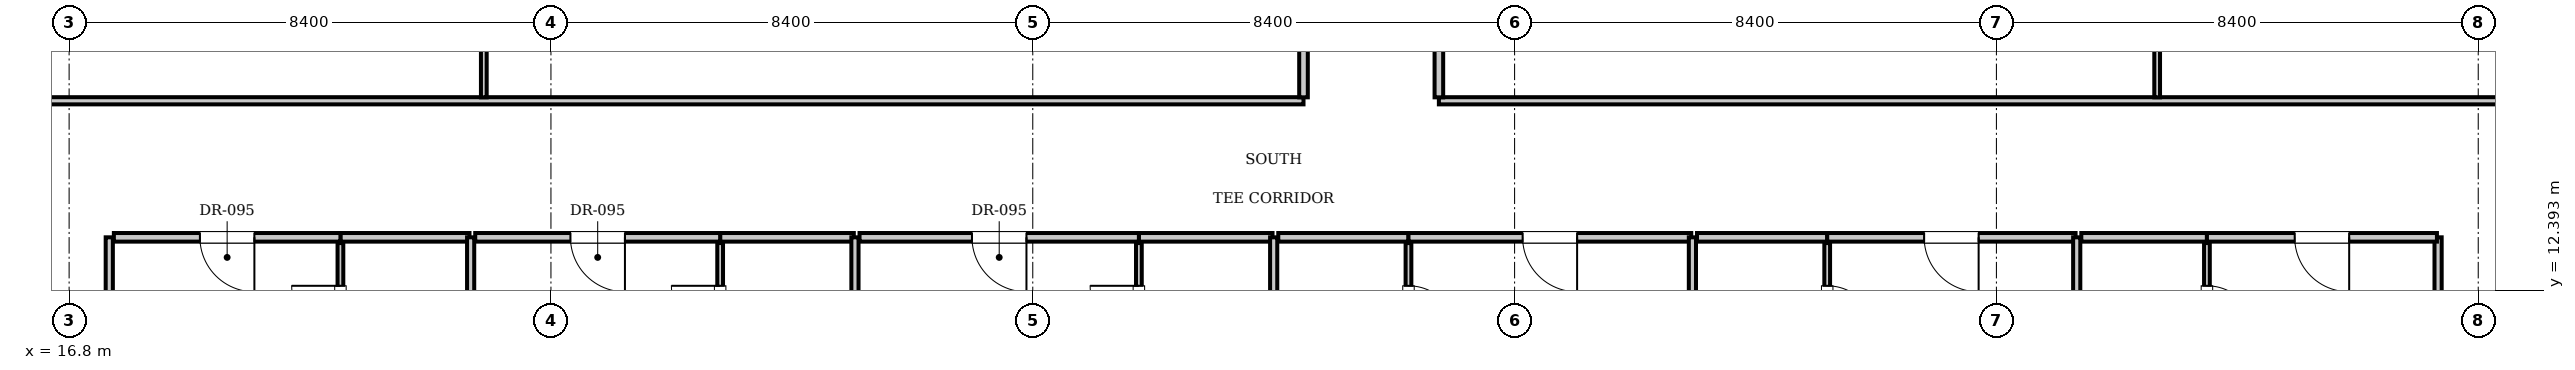
"""IFC4 building model, lengths in metres.
Left out: names, types, materials, properties, quantities, classifications, styles, units other than length and angle.
Written with IfcOpenShell. Run it as: python <this file> out.ifc"""

import sys

from ifc_helpers import new_model, si_unit, direction, frame, frame_2d, origin, place, context, subcontext, project, spatial, rectangle, extrude, element, fill, save


model = new_model("IFC4")
c1 = context("Model", 3, precision=1e-05, world=origin(), true_north=direction((0.0, 1.0)))
c2 = subcontext(c1, "Body", "Model", "MODEL_VIEW")
j1 = project(units=[si_unit("LENGTHUNIT", "METRE"), si_unit("PLANEANGLEUNIT", "RADIAN")], contexts=[c1])
p1 = place(None, origin())
s1 = spatial("IfcSite", under=j1, at=p1, CompositionType="ELEMENT")
p2 = place(p1, origin())
s2 = spatial("IfcBuilding", under=s1, at=p2, CompositionType="ELEMENT")
p3 = place(p2, frame((0.0, 0.0, 200.55)))
s3 = spatial("IfcBuildingStorey", under=s2, at=p3, CompositionType="ELEMENT", Elevation=200.55)
for number, where, z_axis, x_axis in (
    (1, (17.5, 9.0, 0.0), (0.0, 0.0, 1.0), (0.0, 1.0, 0.0)),
    (2, (58.1, 9.0, 0.0), (0.0, 0.0, 1.0), (0.0, 1.0, 0.0)),
):
    element("IfcWall", number, at=place(p3, frame(where, z_axis=z_axis, x_axis=x_axis)), inside=s3, PredefinedType="PARTITIONING", context=c2, shape_type="SweptSolid", body=[
        extrude(rectangle(XDim=4.32, YDim=0.125, at=frame_2d((2.16, 0.0))), origin(), (0.0, 0.0, 1.0), 3.61),
    ])
p4 = place(p3, frame((21.53, 13.32, 0.0), z_axis=(0.0, 0.0, 1.0), x_axis=(1.0, 0.0, 0.0)))
e3 = element("IfcWall", 3, at=p4, inside=s3, PredefinedType="PARTITIONING", context=c2, shape_type="SweptSolid", body=[
    extrude(rectangle(XDim=2.25, YDim=0.15, at=frame_2d((1.125, 0.0))), origin(), (0.0, 0.0, 1.0), 3.61),
])
p5 = place(p3, frame((21.53, 10.88, 0.0), z_axis=(0.0, 0.0, 1.0), x_axis=(0.0, 1.0, 0.0)))
e4 = element("IfcWall", 4, at=p5, inside=s3, PredefinedType="PARTITIONING", context=c2, shape_type="SweptSolid", body=[
    extrude(rectangle(XDim=2.34, YDim=0.1, at=frame_2d((1.17, 0.0))), origin(), (0.0, 0.0, 1.0), 3.61),
])
p6 = place(p5, frame((0.745, 0.0, 0.0)))
e5 = element("IfcOpeningElement", 5, at=p6, cuts=e4, PredefinedType="OPENING", context=c2, shape_type="SweptSolid", body=[
    extrude(rectangle(XDim=0.85, YDim=2.1, at=frame_2d((0.425, 1.05))), frame((0.0, 0.06, 0.0), z_axis=(0.0, -1.0, 0.0), x_axis=(1.0, 0.0, 0.0)), (0.0, 0.0, 1.0), 0.12),
])
p7 = place(p3, frame((17.58, 13.32, 0.0), z_axis=(0.0, 0.0, 1.0), x_axis=(1.0, 0.0, 0.0)))
e6 = element("IfcWall", 6, at=p7, inside=s3, PredefinedType="PARTITIONING", context=c2, shape_type="SweptSolid", body=[
    extrude(rectangle(XDim=3.95, YDim=0.15, at=frame_2d((1.975, 0.0))), origin(), (0.0, 0.0, 1.0), 3.61),
])
p8 = place(p7, frame((1.5, 0.0, 0.0)))
e7 = element("IfcOpeningElement", 7, at=p8, cuts=e6, PredefinedType="OPENING", context=c2, shape_type="SweptSolid", body=[
    extrude(rectangle(XDim=0.95, YDim=2.15, at=frame_2d((0.475, 1.075))), frame((0.0, 0.085, 0.0), z_axis=(0.0, -1.0, 0.0), x_axis=(1.0, 0.0, 0.0)), (0.0, 0.0, 1.0), 0.17),
])
p9 = place(p3, frame((23.8, 4.7, 0.0), z_axis=(0.0, 0.0, 1.0), x_axis=(0.0, 1.0, 0.0)))
e8 = element("IfcWall", 8, at=p9, inside=s3, PredefinedType="PARTITIONING", context=c2, shape_type="SweptSolid", body=[
    extrude(rectangle(XDim=8.62, YDim=0.125, at=frame_2d((4.31, 0.0))), origin(), (0.0, 0.0, 1.0), 3.61),
])
p10 = place(p3, frame((28.15, 13.32, 0.0), z_axis=(0.0, 0.0, 1.0), x_axis=(1.0, 0.0, 0.0)))
e9 = element("IfcWall", 9, at=p10, inside=s3, PredefinedType="PARTITIONING", context=c2, shape_type="SweptSolid", body=[
    extrude(rectangle(XDim=2.33, YDim=0.15, at=frame_2d((1.165, 0.0))), origin(), (0.0, 0.0, 1.0), 3.61),
])
p11 = place(p3, frame((28.15, 10.88, 0.0), z_axis=(0.0, 0.0, 1.0), x_axis=(0.0, 1.0, 0.0)))
e10 = element("IfcWall", 10, at=p11, inside=s3, PredefinedType="PARTITIONING", context=c2, shape_type="SweptSolid", body=[
    extrude(rectangle(XDim=2.34, YDim=0.1, at=frame_2d((1.17, 0.0))), origin(), (0.0, 0.0, 1.0), 3.61),
])
p12 = place(p11, frame((0.745, 0.0, 0.0)))
e11 = element("IfcOpeningElement", 11, at=p12, cuts=e10, PredefinedType="OPENING", context=c2, shape_type="SweptSolid", body=[
    extrude(rectangle(XDim=0.85, YDim=2.1, at=frame_2d((0.425, 1.05))), frame((0.0, 0.06, 0.0), z_axis=(0.0, -1.0, 0.0), x_axis=(1.0, 0.0, 0.0)), (0.0, 0.0, 1.0), 0.12),
])
p13 = place(p3, frame((23.88, 13.32, 0.0), z_axis=(0.0, 0.0, 1.0), x_axis=(1.0, 0.0, 0.0)))
e12 = element("IfcWall", 12, at=p13, inside=s3, PredefinedType="PARTITIONING", context=c2, shape_type="SweptSolid", body=[
    extrude(rectangle(XDim=4.27, YDim=0.15, at=frame_2d((2.135, 0.0))), origin(), (0.0, 0.0, 1.0), 3.61),
])
p14 = place(p13, frame((1.66, 0.0, 0.0)))
e13 = element("IfcOpeningElement", 13, at=p14, cuts=e12, PredefinedType="OPENING", context=c2, shape_type="SweptSolid", body=[
    extrude(rectangle(XDim=0.95, YDim=2.15, at=frame_2d((0.475, 1.075))), frame((0.0, 0.085, 0.0), z_axis=(0.0, -1.0, 0.0), x_axis=(1.0, 0.0, 0.0)), (0.0, 0.0, 1.0), 0.17),
])
p15 = place(p3, frame((30.5, 4.7, 0.0), z_axis=(0.0, 0.0, 1.0), x_axis=(0.0, 1.0, 0.0)))
e14 = element("IfcWall", 14, at=p15, inside=s3, PredefinedType="PARTITIONING", context=c2, shape_type="SweptSolid", body=[
    extrude(rectangle(XDim=8.62, YDim=0.125, at=frame_2d((4.31, 0.0))), origin(), (0.0, 0.0, 1.0), 3.61),
])
p16 = place(p3, frame((35.45, 13.32, 0.0), z_axis=(0.0, 0.0, 1.0), x_axis=(1.0, 0.0, 0.0)))
e15 = element("IfcWall", 15, at=p16, inside=s3, PredefinedType="PARTITIONING", context=c2, shape_type="SweptSolid", body=[
    extrude(rectangle(XDim=2.33, YDim=0.15, at=frame_2d((1.165, 0.0))), origin(), (0.0, 0.0, 1.0), 3.61),
])
p17 = place(p3, frame((35.45, 10.88, 0.0), z_axis=(0.0, 0.0, 1.0), x_axis=(0.0, 1.0, 0.0)))
e16 = element("IfcWall", 16, at=p17, inside=s3, PredefinedType="PARTITIONING", context=c2, shape_type="SweptSolid", body=[
    extrude(rectangle(XDim=2.34, YDim=0.1, at=frame_2d((1.17, 0.0))), origin(), (0.0, 0.0, 1.0), 3.61),
])
p18 = place(p17, frame((0.745, 0.0, 0.0)))
e17 = element("IfcOpeningElement", 17, at=p18, cuts=e16, PredefinedType="OPENING", context=c2, shape_type="SweptSolid", body=[
    extrude(rectangle(XDim=0.85, YDim=2.1, at=frame_2d((0.425, 1.05))), frame((0.0, 0.06, 0.0), z_axis=(0.0, -1.0, 0.0), x_axis=(1.0, 0.0, 0.0)), (0.0, 0.0, 1.0), 0.12),
])
p19 = place(p3, frame((30.58, 13.32, 0.0), z_axis=(0.0, 0.0, 1.0), x_axis=(1.0, 0.0, 0.0)))
e18 = element("IfcWall", 18, at=p19, inside=s3, PredefinedType="PARTITIONING", context=c2, shape_type="SweptSolid", body=[
    extrude(rectangle(XDim=4.87, YDim=0.15, at=frame_2d((2.435, 0.0))), origin(), (0.0, 0.0, 1.0), 3.61),
])
p20 = place(p19, frame((1.96, 0.0, 0.0)))
e19 = element("IfcOpeningElement", 19, at=p20, cuts=e18, PredefinedType="OPENING", context=c2, shape_type="SweptSolid", body=[
    extrude(rectangle(XDim=0.95, YDim=2.15, at=frame_2d((0.475, 1.075))), frame((0.0, 0.085, 0.0), z_axis=(0.0, -1.0, 0.0), x_axis=(1.0, 0.0, 0.0)), (0.0, 0.0, 1.0), 0.17),
])
p21 = place(p3, frame((37.8, 4.7, 0.0), z_axis=(0.0, 0.0, 1.0), x_axis=(0.0, 1.0, 0.0)))
e20 = element("IfcWall", 20, at=p21, inside=s3, PredefinedType="PARTITIONING", context=c2, shape_type="SweptSolid", body=[
    extrude(rectangle(XDim=8.62, YDim=0.125, at=frame_2d((4.31, 0.0))), origin(), (0.0, 0.0, 1.0), 3.352),
])
p22 = place(p3, frame((37.88, 13.32, 0.0), z_axis=(0.0, 0.0, 1.0), x_axis=(1.0, 0.0, 0.0)))
e21 = element("IfcWall", 21, at=p22, inside=s3, PredefinedType="PARTITIONING", context=c2, shape_type="SweptSolid", body=[
    extrude(rectangle(XDim=2.27, YDim=0.15, at=frame_2d((1.135, 0.0))), origin(), (0.0, 0.0, 1.0), 3.61),
])
p23 = place(p3, frame((40.15, 10.88, 0.0), z_axis=(0.0, 0.0, 1.0), x_axis=(0.0, 1.0, 0.0)))
e22 = element("IfcWall", 22, at=p23, inside=s3, PredefinedType="PARTITIONING", context=c2, shape_type="SweptSolid", body=[
    extrude(rectangle(XDim=2.34, YDim=0.1, at=frame_2d((1.17, 0.0))), origin(), (0.0, 0.0, 1.0), 3.61),
])
p24 = place(p23, frame((0.745, 0.0, 0.0)))
e23 = element("IfcOpeningElement", 23, at=p24, cuts=e22, PredefinedType="OPENING", context=c2, shape_type="SweptSolid", body=[
    extrude(rectangle(XDim=0.85, YDim=2.1, at=frame_2d((0.425, 1.05))), frame((0.0, 0.06, 0.0), z_axis=(0.0, -1.0, 0.0), x_axis=(1.0, 0.0, 0.0)), (0.0, 0.0, 1.0), 0.12),
])
p25 = place(p3, frame((40.15, 13.32, 0.0), z_axis=(0.0, 0.0, 1.0), x_axis=(1.0, 0.0, 0.0)))
e24 = element("IfcWall", 24, at=p25, inside=s3, PredefinedType="PARTITIONING", context=c2, shape_type="SweptSolid", body=[
    extrude(rectangle(XDim=4.93, YDim=0.15, at=frame_2d((2.465, 0.0))), origin(), (0.0, 0.0, 1.0), 3.61),
])
p26 = place(p25, frame((1.99, 0.0, 0.0)))
e25 = element("IfcOpeningElement", 25, at=p26, cuts=e24, PredefinedType="OPENING", context=c2, shape_type="SweptSolid", body=[
    extrude(rectangle(XDim=0.95, YDim=2.15, at=frame_2d((0.475, 1.075))), frame((0.0, 0.085, 0.0), z_axis=(0.0, -1.0, 0.0), x_axis=(1.0, 0.0, 0.0)), (0.0, 0.0, 1.0), 0.17),
])
p27 = place(p3, frame((45.1, 4.7, 0.0), z_axis=(0.0, 0.0, 1.0), x_axis=(0.0, 1.0, 0.0)))
e26 = element("IfcWall", 26, at=p27, inside=s3, PredefinedType="PARTITIONING", context=c2, shape_type="SweptSolid", body=[
    extrude(rectangle(XDim=8.62, YDim=0.125, at=frame_2d((4.31, 0.0))), origin(), (0.0, 0.0, 1.0), 3.61),
])
p28 = place(p3, frame((45.18, 13.32, 0.0), z_axis=(0.0, 0.0, 1.0), x_axis=(1.0, 0.0, 0.0)))
e27 = element("IfcWall", 27, at=p28, inside=s3, PredefinedType="PARTITIONING", context=c2, shape_type="SweptSolid", body=[
    extrude(rectangle(XDim=2.27, YDim=0.15, at=frame_2d((1.135, 0.0))), origin(), (0.0, 0.0, 1.0), 3.61),
])
p29 = place(p3, frame((47.45, 10.88, 0.0), z_axis=(0.0, 0.0, 1.0), x_axis=(0.0, 1.0, 0.0)))
e28 = element("IfcWall", 28, at=p29, inside=s3, PredefinedType="PARTITIONING", context=c2, shape_type="SweptSolid", body=[
    extrude(rectangle(XDim=2.34, YDim=0.1, at=frame_2d((1.17, 0.0))), origin(), (0.0, 0.0, 1.0), 3.61),
])
p30 = place(p29, frame((0.745, 0.0, 0.0)))
e29 = element("IfcOpeningElement", 29, at=p30, cuts=e28, PredefinedType="OPENING", context=c2, shape_type="SweptSolid", body=[
    extrude(rectangle(XDim=0.85, YDim=2.1, at=frame_2d((0.425, 1.05))), frame((0.0, 0.06, 0.0), z_axis=(0.0, -1.0, 0.0), x_axis=(1.0, 0.0, 0.0)), (0.0, 0.0, 1.0), 0.12),
])
p31 = place(p3, frame((47.45, 13.32, 0.0), z_axis=(0.0, 0.0, 1.0), x_axis=(1.0, 0.0, 0.0)))
e30 = element("IfcWall", 30, at=p31, inside=s3, PredefinedType="PARTITIONING", context=c2, shape_type="SweptSolid", body=[
    extrude(rectangle(XDim=4.33, YDim=0.15, at=frame_2d((2.165, 0.0))), origin(), (0.0, 0.0, 1.0), 3.61),
])
p32 = place(p31, frame((1.69, 0.0, 0.0)))
e31 = element("IfcOpeningElement", 31, at=p32, cuts=e30, PredefinedType="OPENING", context=c2, shape_type="SweptSolid", body=[
    extrude(rectangle(XDim=0.95, YDim=2.15, at=frame_2d((0.475, 1.075))), frame((0.0, 0.085, 0.0), z_axis=(0.0, -1.0, 0.0), x_axis=(1.0, 0.0, 0.0)), (0.0, 0.0, 1.0), 0.17),
])
p33 = place(p3, frame((51.8, 4.7, 0.0), z_axis=(0.0, 0.0, 1.0), x_axis=(0.0, 1.0, 0.0)))
e32 = element("IfcWall", 32, at=p33, inside=s3, PredefinedType="PARTITIONING", context=c2, shape_type="SweptSolid", body=[
    extrude(rectangle(XDim=8.62, YDim=0.125, at=frame_2d((4.31, 0.0))), origin(), (0.0, 0.0, 1.0), 3.61),
])
p34 = place(p3, frame((51.88, 13.32, 0.0), z_axis=(0.0, 0.0, 1.0), x_axis=(1.0, 0.0, 0.0)))
e33 = element("IfcWall", 33, at=p34, inside=s3, PredefinedType="PARTITIONING", context=c2, shape_type="SweptSolid", body=[
    extrude(rectangle(XDim=2.19, YDim=0.15, at=frame_2d((1.095, 0.0))), origin(), (0.0, 0.0, 1.0), 3.61),
])
p35 = place(p3, frame((54.07, 10.88, 0.0), z_axis=(0.0, 0.0, 1.0), x_axis=(0.0, 1.0, 0.0)))
e34 = element("IfcWall", 34, at=p35, inside=s3, PredefinedType="PARTITIONING", context=c2, shape_type="SweptSolid", body=[
    extrude(rectangle(XDim=2.34, YDim=0.1, at=frame_2d((1.17, 0.0))), origin(), (0.0, 0.0, 1.0), 3.61),
])
p36 = place(p35, frame((0.745, 0.0, 0.0)))
e35 = element("IfcOpeningElement", 35, at=p36, cuts=e34, PredefinedType="OPENING", context=c2, shape_type="SweptSolid", body=[
    extrude(rectangle(XDim=0.85, YDim=2.1, at=frame_2d((0.425, 1.05))), frame((0.0, 0.06, 0.0), z_axis=(0.0, -1.0, 0.0), x_axis=(1.0, 0.0, 0.0)), (0.0, 0.0, 1.0), 0.12),
])
p37 = place(p3, frame((54.07, 13.32, 0.0), z_axis=(0.0, 0.0, 1.0), x_axis=(1.0, 0.0, 0.0)))
e36 = element("IfcWall", 36, at=p37, inside=s3, PredefinedType="PARTITIONING", context=c2, shape_type="SweptSolid", body=[
    extrude(rectangle(XDim=4.01, YDim=0.15, at=frame_2d((2.005, 0.0))), origin(), (0.0, 0.0, 1.0), 3.61),
])
p38 = place(p37, frame((1.53, 0.0, 0.0)))
e37 = element("IfcOpeningElement", 37, at=p38, cuts=e36, PredefinedType="OPENING", context=c2, shape_type="SweptSolid", body=[
    extrude(rectangle(XDim=0.95, YDim=2.15, at=frame_2d((0.475, 1.075))), frame((0.0, 0.085, 0.0), z_axis=(0.0, -1.0, 0.0), x_axis=(1.0, 0.0, 0.0)), (0.0, 0.0, 1.0), 0.17),
])
p39 = place(p3, frame((13.2, 15.7, 0.0), z_axis=(0.0, 0.0, 1.0), x_axis=(1.0, 0.0, 0.0)))
e38 = element("IfcWall", 38, at=p39, inside=s3, PredefinedType="PARTITIONING", context=c2, shape_type="SweptSolid", body=[
    extrude(rectangle(XDim=25.12, YDim=0.125, at=frame_2d((12.56, 0.0))), origin(), (0.0, 0.0, 1.0), 3.61),
])
p40 = place(p3, frame((40.68, 15.7, 0.0), z_axis=(0.0, 0.0, 1.0), x_axis=(1.0, 0.0, 0.0)))
e39 = element("IfcWall", 39, at=p40, inside=s3, PredefinedType="PARTITIONING", context=c2, shape_type="SweptSolid", body=[
    extrude(rectangle(XDim=21.72, YDim=0.125, at=frame_2d((10.86, 0.0))), origin(), (0.0, 0.0, 1.0), 3.61),
])
p41 = place(p3, frame((38.32, 15.76, 0.0), z_axis=(0.0, 0.0, 1.0), x_axis=(0.0, 1.0, 0.0)))
e40 = element("IfcWall", 40, at=p41, inside=s3, PredefinedType="PARTITIONING", context=c2, shape_type="SweptSolid", body=[
    extrude(rectangle(XDim=5.14, YDim=0.15, at=frame_2d((2.57, 0.0))), origin(), (0.0, 0.0, 1.0), 3.61),
])
p42 = place(p41, frame((2.095, 0.0, 0.0)))
e41 = element("IfcOpeningElement", 41, at=p42, cuts=e40, PredefinedType="OPENING", context=c2, shape_type="SweptSolid", body=[
    extrude(rectangle(XDim=0.95, YDim=2.15, at=frame_2d((0.475, 1.075))), frame((0.0, 0.085, 0.0), z_axis=(0.0, -1.0, 0.0), x_axis=(1.0, 0.0, 0.0)), (0.0, 0.0, 1.0), 0.17),
])
p43 = place(p3, frame((24.03, 15.76, 0.0), z_axis=(0.0, 0.0, 1.0), x_axis=(0.0, 1.0, 0.0)))
e42 = element("IfcWall", 42, at=p43, inside=s3, PredefinedType="PARTITIONING", context=c2, shape_type="SweptSolid", body=[
    extrude(rectangle(XDim=7.43, YDim=0.1, at=frame_2d((3.715, 0.0))), origin(), (0.0, 0.0, 1.0), 3.61),
])
p44 = place(p43, frame((3.265, 0.0, 0.0)))
e43 = element("IfcOpeningElement", 43, at=p44, cuts=e42, PredefinedType="OPENING", context=c2, shape_type="SweptSolid", body=[
    extrude(rectangle(XDim=0.9, YDim=2.1, at=frame_2d((0.45, 1.05))), frame((0.0, 0.06, 0.0), z_axis=(0.0, -1.0, 0.0), x_axis=(1.0, 0.0, 0.0)), (0.0, 0.0, 1.0), 0.12),
])
p45 = place(p3, frame((40.68, 15.76, 0.0), z_axis=(0.0, 0.0, 1.0), x_axis=(0.0, 1.0, 0.0)))
e44 = element("IfcWall", 44, at=p45, inside=s3, PredefinedType="PARTITIONING", context=c2, shape_type="SweptSolid", body=[
    extrude(rectangle(XDim=5.14, YDim=0.15, at=frame_2d((2.57, 0.0))), origin(), (0.0, 0.0, 1.0), 3.61),
])
p46 = place(p45, frame((3.055, 0.0, 0.0)))
e45 = element("IfcOpeningElement", 45, at=p46, cuts=e44, PredefinedType="OPENING", context=c2, shape_type="SweptSolid", body=[
    extrude(rectangle(XDim=0.95, YDim=2.15, at=frame_2d((0.475, 1.075))), frame((0.0, 0.085, 0.0), z_axis=(0.0, -1.0, 0.0), x_axis=(1.0, 0.0, 0.0)), (0.0, 0.0, 1.0), 0.17),
])
p47 = place(p3, frame((53.202, 15.76, 0.0), z_axis=(0.0, 0.0, 1.0), x_axis=(0.0, 1.0, 0.0)))
e46 = element("IfcWall", 46, at=p47, inside=s3, PredefinedType="PARTITIONING", context=c2, shape_type="SweptSolid", body=[
    extrude(rectangle(XDim=7.43, YDim=0.1, at=frame_2d((3.715, 0.0))), origin(), (0.0, 0.0, 1.0), 3.61),
])
p48 = place(p47, frame((3.265, 0.0, 0.0)))
e47 = element("IfcOpeningElement", 47, at=p48, cuts=e46, PredefinedType="OPENING", context=c2, shape_type="SweptSolid", body=[
    extrude(rectangle(XDim=0.9, YDim=2.1, at=frame_2d((0.45, 1.05))), frame((0.0, 0.06, 0.0), z_axis=(0.0, -1.0, 0.0), x_axis=(1.0, 0.0, 0.0)), (0.0, 0.0, 1.0), 0.12),
])
p49 = place(p6, origin())
e48 = element("IfcDoor", 48, at=p49, inside=s3, OperationType="SINGLE_SWING_RIGHT", PredefinedType="DOOR", context=c2, shape_type="SweptSolid", body=[
    extrude(rectangle(XDim=0.85, YDim=2.1, at=frame_2d((0.425, 1.05))), frame((0.0, 0.025, 0.0), z_axis=(0.0, -1.0, 0.0), x_axis=(1.0, 0.0, 0.0)), (0.0, 0.0, 1.0), 0.05),
])
fill(e5, e48)
p50 = place(p8, frame((0.95, 0.0, 0.0), z_axis=(0.0, 0.0, 1.0), x_axis=(-1.0, 0.0, 0.0)))
e49 = element("IfcDoor", 49, at=p50, inside=s3, OperationType="SINGLE_SWING_LEFT", PredefinedType="DOOR", context=c2, shape_type="SweptSolid", body=[
    extrude(rectangle(XDim=0.95, YDim=2.15, at=frame_2d((0.475, 1.075))), frame((0.0, 0.025, 0.0), z_axis=(0.0, -1.0, 0.0), x_axis=(1.0, 0.0, 0.0)), (0.0, 0.0, 1.0), 0.05),
])
fill(e7, e49)
p51 = place(p12, origin())
e50 = element("IfcDoor", 50, at=p51, inside=s3, OperationType="SINGLE_SWING_RIGHT", PredefinedType="DOOR", context=c2, shape_type="SweptSolid", body=[
    extrude(rectangle(XDim=0.85, YDim=2.1, at=frame_2d((0.425, 1.05))), frame((0.0, 0.025, 0.0), z_axis=(0.0, -1.0, 0.0), x_axis=(1.0, 0.0, 0.0)), (0.0, 0.0, 1.0), 0.05),
])
fill(e11, e50)
p52 = place(p14, frame((0.95, 0.0, 0.0), z_axis=(0.0, 0.0, 1.0), x_axis=(-1.0, 0.0, 0.0)))
e51 = element("IfcDoor", 51, at=p52, inside=s3, OperationType="SINGLE_SWING_LEFT", PredefinedType="DOOR", context=c2, shape_type="SweptSolid", body=[
    extrude(rectangle(XDim=0.95, YDim=2.15, at=frame_2d((0.475, 1.075))), frame((0.0, 0.025, 0.0), z_axis=(0.0, -1.0, 0.0), x_axis=(1.0, 0.0, 0.0)), (0.0, 0.0, 1.0), 0.05),
])
fill(e13, e51)
p53 = place(p18, origin())
e52 = element("IfcDoor", 52, at=p53, inside=s3, OperationType="SINGLE_SWING_RIGHT", PredefinedType="DOOR", context=c2, shape_type="SweptSolid", body=[
    extrude(rectangle(XDim=0.85, YDim=2.1, at=frame_2d((0.425, 1.05))), frame((0.0, 0.025, 0.0), z_axis=(0.0, -1.0, 0.0), x_axis=(1.0, 0.0, 0.0)), (0.0, 0.0, 1.0), 0.05),
])
fill(e17, e52)
p54 = place(p20, frame((0.95, 0.0, 0.0), z_axis=(0.0, 0.0, 1.0), x_axis=(-1.0, 0.0, 0.0)))
e53 = element("IfcDoor", 53, at=p54, inside=s3, OperationType="SINGLE_SWING_LEFT", PredefinedType="DOOR", context=c2, shape_type="SweptSolid", body=[
    extrude(rectangle(XDim=0.95, YDim=2.15, at=frame_2d((0.475, 1.075))), frame((0.0, 0.025, 0.0), z_axis=(0.0, -1.0, 0.0), x_axis=(1.0, 0.0, 0.0)), (0.0, 0.0, 1.0), 0.05),
])
fill(e19, e53)
p55 = place(p24, frame((0.85, 0.0, 0.0), z_axis=(0.0, 0.0, 1.0), x_axis=(-1.0, 0.0, 0.0)))
e54 = element("IfcDoor", 54, at=p55, inside=s3, OperationType="SINGLE_SWING_RIGHT", PredefinedType="DOOR", context=c2, shape_type="SweptSolid", body=[
    extrude(rectangle(XDim=0.85, YDim=2.1, at=frame_2d((0.425, 1.05))), frame((0.0, 0.025, 0.0), z_axis=(0.0, -1.0, 0.0), x_axis=(1.0, 0.0, 0.0)), (0.0, 0.0, 1.0), 0.05),
])
fill(e23, e54)
p56 = place(p26, frame((0.95, 0.0, 0.0), z_axis=(0.0, 0.0, 1.0), x_axis=(-1.0, 0.0, 0.0)))
e55 = element("IfcDoor", 55, at=p56, inside=s3, OperationType="SINGLE_SWING_LEFT", PredefinedType="DOOR", context=c2, shape_type="SweptSolid", body=[
    extrude(rectangle(XDim=0.95, YDim=2.15, at=frame_2d((0.475, 1.075))), frame((0.0, 0.025, 0.0), z_axis=(0.0, -1.0, 0.0), x_axis=(1.0, 0.0, 0.0)), (0.0, 0.0, 1.0), 0.05),
])
fill(e25, e55)
p57 = place(p30, frame((0.85, 0.0, 0.0), z_axis=(0.0, 0.0, 1.0), x_axis=(-1.0, 0.0, 0.0)))
e56 = element("IfcDoor", 56, at=p57, inside=s3, OperationType="SINGLE_SWING_RIGHT", PredefinedType="DOOR", context=c2, shape_type="SweptSolid", body=[
    extrude(rectangle(XDim=0.85, YDim=2.1, at=frame_2d((0.425, 1.05))), frame((0.0, 0.025, 0.0), z_axis=(0.0, -1.0, 0.0), x_axis=(1.0, 0.0, 0.0)), (0.0, 0.0, 1.0), 0.05),
])
fill(e29, e56)
p58 = place(p32, frame((0.95, 0.0, 0.0), z_axis=(0.0, 0.0, 1.0), x_axis=(-1.0, 0.0, 0.0)))
e57 = element("IfcDoor", 57, at=p58, inside=s3, OperationType="SINGLE_SWING_LEFT", PredefinedType="DOOR", context=c2, shape_type="SweptSolid", body=[
    extrude(rectangle(XDim=0.95, YDim=2.15, at=frame_2d((0.475, 1.075))), frame((0.0, 0.025, 0.0), z_axis=(0.0, -1.0, 0.0), x_axis=(1.0, 0.0, 0.0)), (0.0, 0.0, 1.0), 0.05),
])
fill(e31, e57)
p59 = place(p36, frame((0.85, 0.0, 0.0), z_axis=(0.0, 0.0, 1.0), x_axis=(-1.0, 0.0, 0.0)))
e58 = element("IfcDoor", 58, at=p59, inside=s3, OperationType="SINGLE_SWING_RIGHT", PredefinedType="DOOR", context=c2, shape_type="SweptSolid", body=[
    extrude(rectangle(XDim=0.85, YDim=2.1, at=frame_2d((0.425, 1.05))), frame((0.0, 0.025, 0.0), z_axis=(0.0, -1.0, 0.0), x_axis=(1.0, 0.0, 0.0)), (0.0, 0.0, 1.0), 0.05),
])
fill(e35, e58)
p60 = place(p38, frame((0.95, 0.0, 0.0), z_axis=(0.0, 0.0, 1.0), x_axis=(-1.0, 0.0, 0.0)))
e59 = element("IfcDoor", 59, at=p60, inside=s3, OperationType="SINGLE_SWING_LEFT", PredefinedType="DOOR", context=c2, shape_type="SweptSolid", body=[
    extrude(rectangle(XDim=0.95, YDim=2.15, at=frame_2d((0.475, 1.075))), frame((0.0, 0.025, 0.0), z_axis=(0.0, -1.0, 0.0), x_axis=(1.0, 0.0, 0.0)), (0.0, 0.0, 1.0), 0.05),
])
fill(e37, e59)
save(model, sys.argv[1])
